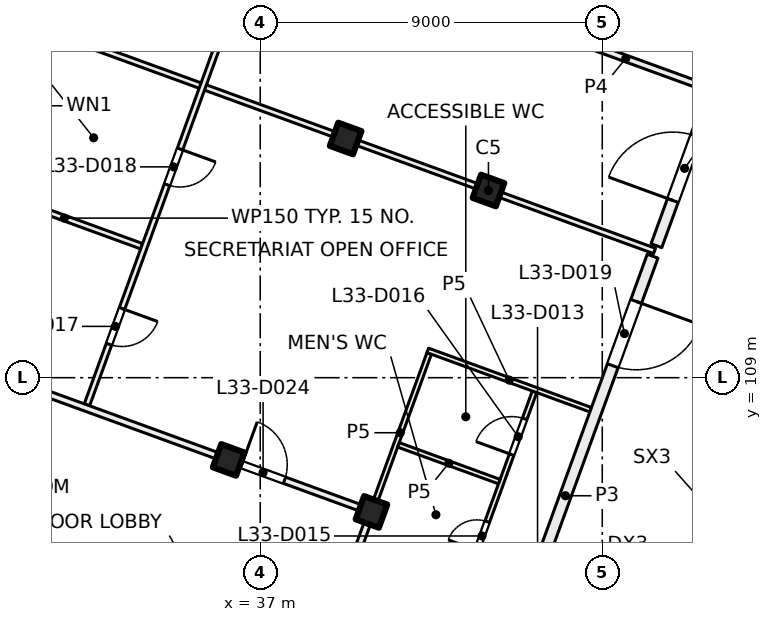
"""IFC4 building model, lengths in metres.
Left out: names, types, materials, properties, quantities, classifications, styles, units other than length and angle.
Written with IfcOpenShell. Run it as: python <this file> out.ifc"""

import sys

from ifc_helpers import new_model, si_unit, direction, frame, frame_2d, origin, origin_2d, place, context, subcontext, project, spatial, rectangle, extrude, element, fill, save


model = new_model("IFC4")
c1 = context("Model", 3, precision=1e-05, world=origin(), true_north=direction((0.0, 1.0)))
c2 = subcontext(c1, "Body", "Model", "MODEL_VIEW")
j1 = project(units=[si_unit("LENGTHUNIT", "METRE"), si_unit("PLANEANGLEUNIT", "RADIAN")], contexts=[c1])
p1 = place(None, origin())
s1 = spatial("IfcSite", under=j1, at=p1, CompositionType="ELEMENT")
p2 = place(p1, origin())
s2 = spatial("IfcBuilding", under=s1, at=p2, CompositionType="ELEMENT")
p3 = place(p2, frame((0.0, 0.0, 142.5)))
s3 = spatial("IfcBuildingStorey", under=s2, at=p3, CompositionType="ELEMENT", Elevation=142.5)
for number, where, z_axis, x_axis in (
    (1, (43.006, 113.925, 0.0), (0.0, 0.0, 1.0), (-0.342, -0.94, 0.0)),
    (2, (39.927, 105.468, 0.0), (0.0, 0.0, 1.0), (-0.342, -0.94, 0.0)),
    (3, (39.247, 115.293, 0.0), (0.0, 0.0, 1.0), (-0.342, -0.94, 0.0)),
    (4, (36.169, 106.836, 0.0), (0.0, 0.0, 1.0), (-0.342, -0.94, 0.0)),
):
    element("IfcColumn", number, at=place(p3, frame(where, z_axis=z_axis, x_axis=x_axis)), inside=s3, PredefinedType="COLUMN", context=c2, shape_type="SweptSolid", body=[
        extrude(rectangle(XDim=0.65, YDim=0.65, at=origin_2d()), origin(), (0.0, 0.0, 1.0), 4.0),
    ])
p4 = place(p3, frame((52.212, 113.783, 0.0), z_axis=(0.0, 0.0, 1.0), x_axis=(-0.34202521188, -0.939690775968, 0.0)))
e5 = element("IfcWall", 5, at=p4, inside=s3, PredefinedType="SOLIDWALL", context=c2, shape_type="SweptSolid", body=[
    extrude(rectangle(XDim=21.745, YDim=0.6, at=frame_2d((10.873, 0.0))), origin(), (0.0, 0.0, 1.0), 3.625),
])
p5 = place(p4, frame((3.765, 0.0, 0.9)))
e6 = element("IfcOpeningElement", 6, at=p5, cuts=e5, PredefinedType="OPENING", context=c2, shape_type="SweptSolid", body=[
    extrude(rectangle(XDim=3.0, YDim=2.4, at=frame_2d((1.5, 1.2))), frame((0.0, 0.31, 0.0), z_axis=(0.0, -1.0, 0.0), x_axis=(1.0, 0.0, 0.0)), (0.0, 0.0, 1.0), 0.62),
])
p6 = place(p4, frame((8.865, 0.0, 0.0)))
e7 = element("IfcOpeningElement", 7, at=p6, cuts=e5, PredefinedType="OPENING", context=c2, shape_type="SweptSolid", body=[
    extrude(rectangle(XDim=1.8, YDim=2.4, at=frame_2d((0.9, 1.2))), frame((0.0, 0.31, 0.0), z_axis=(0.0, -1.0, 0.0), x_axis=(1.0, 0.0, 0.0)), (0.0, 0.0, 1.0), 0.62),
])
p7 = place(p4, frame((12.765, 0.0, 0.9)))
e8 = element("IfcOpeningElement", 8, at=p7, cuts=e5, PredefinedType="OPENING", context=c2, shape_type="SweptSolid", body=[
    extrude(rectangle(XDim=3.0, YDim=2.4, at=frame_2d((1.5, 1.2))), frame((0.0, 0.31, 0.0), z_axis=(0.0, -1.0, 0.0), x_axis=(1.0, 0.0, 0.0)), (0.0, 0.0, 1.0), 0.62),
])
p8 = place(p4, frame((17.265, 0.0, 0.9)))
e9 = element("IfcOpeningElement", 9, at=p8, cuts=e5, PredefinedType="OPENING", context=c2, shape_type="SweptSolid", body=[
    extrude(rectangle(XDim=3.0, YDim=2.4, at=frame_2d((1.5, 1.2))), frame((0.0, 0.31, 0.0), z_axis=(0.0, -1.0, 0.0), x_axis=(1.0, 0.0, 0.0)), (0.0, 0.0, 1.0), 0.62),
])
p9 = place(p3, frame((24.666, 100.669, 0.0), z_axis=(0.0, 0.0, 1.0), x_axis=(0.34201964167, 0.939692803373, 0.0)))
e10 = element("IfcWall", 10, at=p9, inside=s3, PredefinedType="SOLIDWALL", context=c2, shape_type="SweptSolid", body=[
    extrude(rectangle(XDim=32.884, YDim=0.6, at=frame_2d((16.442, 0.0))), origin(), (0.0, 0.0, 1.0), 3.625),
])
p10 = place(p9, frame((1.48, 0.0, 0.9)))
e11 = element("IfcOpeningElement", 11, at=p10, cuts=e10, PredefinedType="OPENING", context=c2, shape_type="SweptSolid", body=[
    extrude(rectangle(XDim=3.0, YDim=2.4, at=frame_2d((1.5, 1.2))), frame((0.0, 0.31, 0.0), z_axis=(0.0, -1.0, 0.0), x_axis=(1.0, 0.0, 0.0)), (0.0, 0.0, 1.0), 0.62),
])
p11 = place(p9, frame((5.98, 0.0, 0.9)))
e12 = element("IfcOpeningElement", 12, at=p11, cuts=e10, PredefinedType="OPENING", context=c2, shape_type="SweptSolid", body=[
    extrude(rectangle(XDim=3.0, YDim=2.4, at=frame_2d((1.5, 1.2))), frame((0.0, 0.31, 0.0), z_axis=(0.0, -1.0, 0.0), x_axis=(1.0, 0.0, 0.0)), (0.0, 0.0, 1.0), 0.62),
])
p12 = place(p9, frame((11.08, 0.0, 0.0)))
e13 = element("IfcOpeningElement", 13, at=p12, cuts=e10, PredefinedType="OPENING", context=c2, shape_type="SweptSolid", body=[
    extrude(rectangle(XDim=1.8, YDim=2.4, at=frame_2d((0.9, 1.2))), frame((0.0, 0.31, 0.0), z_axis=(0.0, -1.0, 0.0), x_axis=(1.0, 0.0, 0.0)), (0.0, 0.0, 1.0), 0.62),
])
p13 = place(p9, frame((14.98, 0.0, 0.9)))
e14 = element("IfcOpeningElement", 14, at=p13, cuts=e10, PredefinedType="OPENING", context=c2, shape_type="SweptSolid", body=[
    extrude(rectangle(XDim=3.0, YDim=2.4, at=frame_2d((1.5, 1.2))), frame((0.0, 0.31, 0.0), z_axis=(0.0, -1.0, 0.0), x_axis=(1.0, 0.0, 0.0)), (0.0, 0.0, 1.0), 0.62),
])
p14 = place(p9, frame((19.48, 0.0, 0.9)))
e15 = element("IfcOpeningElement", 15, at=p14, cuts=e10, PredefinedType="OPENING", context=c2, shape_type="SweptSolid", body=[
    extrude(rectangle(XDim=3.0, YDim=2.4, at=frame_2d((1.5, 1.2))), frame((0.0, 0.31, 0.0), z_axis=(0.0, -1.0, 0.0), x_axis=(1.0, 0.0, 0.0)), (0.0, 0.0, 1.0), 0.62),
])
p15 = place(p9, frame((24.58, 0.0, 0.0)))
e16 = element("IfcOpeningElement", 16, at=p15, cuts=e10, PredefinedType="OPENING", context=c2, shape_type="SweptSolid", body=[
    extrude(rectangle(XDim=1.8, YDim=2.4, at=frame_2d((0.9, 1.2))), frame((0.0, 0.31, 0.0), z_axis=(0.0, -1.0, 0.0), x_axis=(1.0, 0.0, 0.0)), (0.0, 0.0, 1.0), 0.62),
])
p16 = place(p9, frame((28.48, 0.0, 0.9)))
e17 = element("IfcOpeningElement", 17, at=p16, cuts=e10, PredefinedType="OPENING", context=c2, shape_type="SweptSolid", body=[
    extrude(rectangle(XDim=3.0, YDim=2.4, at=frame_2d((1.5, 1.2))), frame((0.0, 0.31, 0.0), z_axis=(0.0, -1.0, 0.0), x_axis=(1.0, 0.0, 0.0)), (0.0, 0.0, 1.0), 0.62),
])
p17 = place(p3, frame((26.736, 105.48, 0.0), z_axis=(0.0, 0.0, 1.0), x_axis=(0.939721611154, -0.341940482438, 0.0)))
e18 = element("IfcWall", 18, at=p17, inside=s3, PredefinedType="PARTITIONING", context=c2, shape_type="SweptSolid", body=[
    extrude(rectangle(XDim=12.312, YDim=0.175, at=frame_2d((6.156, 0.0))), origin(), (0.0, 0.0, 1.0), 3.625),
])
p18 = place(p3, frame((29.814, 113.938, 0.0), z_axis=(0.0, 0.0, 1.0), x_axis=(0.93973078783, -0.341915262023, 0.0)))
e19 = element("IfcWall", 19, at=p18, inside=s3, PredefinedType="PARTITIONING", context=c2, shape_type="SweptSolid", body=[
    extrude(rectangle(XDim=4.326, YDim=0.15, at=frame_2d((2.163, 0.0))), origin(), (0.0, 0.0, 1.0), 3.625),
])
p19 = place(p3, frame((31.353, 118.166, 0.0), z_axis=(0.0, 0.0, 1.0), x_axis=(0.939701413127, -0.341995985602, 0.0)))
e20 = element("IfcWall", 20, at=p19, inside=s3, PredefinedType="PARTITIONING", context=c2, shape_type="SweptSolid", body=[
    extrude(rectangle(XDim=17.05, YDim=0.15, at=frame_2d((8.525, 0.0))), origin(), (0.0, 0.0, 1.0), 3.625),
])
p20 = place(p3, frame((37.053, 120.96, 0.0), z_axis=(0.0, 0.0, 1.0), x_axis=(-0.342023551531, -0.939691380293, 0.0)))
e21 = element("IfcWall", 21, at=p20, inside=s3, PredefinedType="PARTITIONING", context=c2, shape_type="SweptSolid", body=[
    extrude(rectangle(XDim=13.488, YDim=0.15, at=frame_2d((6.744, 0.0))), origin(), (0.0, 0.0, 1.0), 3.625),
])
p21 = place(p20, frame((10.791, 0.0, 0.0)))
e22 = element("IfcOpeningElement", 22, at=p21, cuts=e21, PredefinedType="OPENING", context=c2, shape_type="SweptSolid", body=[
    extrude(rectangle(XDim=1.0, YDim=2.1, at=frame_2d((0.5, 1.05))), frame((0.0, 0.085, 0.0), z_axis=(0.0, -1.0, 0.0), x_axis=(1.0, 0.0, 0.0)), (0.0, 0.0, 1.0), 0.17),
])
p22 = place(p20, frame((6.324, 0.0, 0.0)))
e23 = element("IfcOpeningElement", 23, at=p22, cuts=e21, PredefinedType="OPENING", context=c2, shape_type="SweptSolid", body=[
    extrude(rectangle(XDim=1.0, YDim=2.1, at=frame_2d((0.5, 1.05))), frame((0.0, 0.085, 0.0), z_axis=(0.0, -1.0, 0.0), x_axis=(1.0, 0.0, 0.0)), (0.0, 0.0, 1.0), 0.17),
])
p23 = place(p20, frame((1.824, 0.0, 0.0)))
e24 = element("IfcOpeningElement", 24, at=p23, cuts=e21, PredefinedType="OPENING", context=c2, shape_type="SweptSolid", body=[
    extrude(rectangle(XDim=1.0, YDim=2.1, at=frame_2d((0.5, 1.05))), frame((0.0, 0.085, 0.0), z_axis=(0.0, -1.0, 0.0), x_axis=(1.0, 0.0, 0.0)), (0.0, 0.0, 1.0), 0.17),
])
p24 = place(p3, frame((38.418, 101.322, 0.0), z_axis=(0.0, 0.0, 1.0), x_axis=(0.341987815327, 0.939704386585, 0.0)))
e25 = element("IfcWall", 25, at=p24, inside=s3, PredefinedType="PARTITIONING", context=c2, shape_type="SweptSolid", body=[
    extrude(rectangle(XDim=4.325, YDim=0.175, at=frame_2d((2.162, 0.0))), origin(), (0.0, 0.0, 1.0), 3.625),
])
p25 = place(p3, frame((39.926, 105.465, 0.0), z_axis=(0.0, 0.0, 1.0), x_axis=(0.342263852659, 0.93960388205, 0.0)))
e26 = element("IfcWall", 26, at=p25, inside=s3, PredefinedType="PARTITIONING", context=c2, shape_type="SweptSolid", body=[
    extrude(rectangle(XDim=4.441, YDim=0.125, at=frame_2d((2.221, 0.0))), origin(), (0.0, 0.0, 1.0), 3.625),
])
p26 = place(p3, frame((28.275, 109.709, 0.0), z_axis=(0.0, 0.0, 1.0), x_axis=(0.939698441386, -0.342004150936, 0.0)))
e27 = element("IfcWall", 27, at=p26, inside=s3, PredefinedType="PARTITIONING", context=c2, shape_type="SweptSolid", body=[
    extrude(rectangle(XDim=12.312, YDim=0.175, at=frame_2d((6.156, 0.0))), origin(), (0.0, 0.0, 1.0), 3.625),
])
p27 = place(p26, frame((8.765, 0.0, 0.0)))
e28 = element("IfcOpeningElement", 28, at=p27, cuts=e27, PredefinedType="OPENING", context=c2, shape_type="SweptSolid", body=[
    extrude(rectangle(XDim=1.2, YDim=2.1, at=frame_2d((0.6, 1.05))), frame((0.0, 0.097, 0.0), z_axis=(0.0, -1.0, 0.0), x_axis=(1.0, 0.0, 0.0)), (0.0, 0.0, 1.0), 0.195),
])
p28 = place(p3, frame((41.181, 100.29, 0.0), z_axis=(0.0, 0.0, 1.0), x_axis=(0.34222012082, 0.939619810831, 0.0)))
e29 = element("IfcWall", 29, at=p28, inside=s3, PredefinedType="PARTITIONING", context=c2, shape_type="SweptSolid", body=[
    extrude(rectangle(XDim=8.875, YDim=0.125, at=frame_2d((4.438, 0.0))), origin(), (0.0, 0.0, 1.0), 3.625),
])
p29 = place(p28, frame((1.258, 0.0, 0.0)))
e30 = element("IfcOpeningElement", 30, at=p29, cuts=e29, PredefinedType="OPENING", context=c2, shape_type="SweptSolid", body=[
    extrude(rectangle(XDim=0.8, YDim=2.1, at=frame_2d((0.4, 1.05))), frame((0.0, 0.073, 0.0), z_axis=(0.0, -1.0, 0.0), x_axis=(1.0, 0.0, 0.0)), (0.0, 0.0, 1.0), 0.145),
])
p30 = place(p28, frame((4.437, 0.0, 0.0)))
e31 = element("IfcOpeningElement", 31, at=p30, cuts=e29, PredefinedType="OPENING", context=c2, shape_type="SweptSolid", body=[
    extrude(rectangle(XDim=0.8, YDim=2.1, at=frame_2d((0.4, 1.05))), frame((0.0, 0.073, 0.0), z_axis=(0.0, -1.0, 0.0), x_axis=(1.0, 0.0, 0.0)), (0.0, 0.0, 1.0), 0.145),
])
p31 = place(p28, frame((7.116, 0.0, 0.0)))
e32 = element("IfcOpeningElement", 32, at=p31, cuts=e29, PredefinedType="OPENING", context=c2, shape_type="SweptSolid", body=[
    extrude(rectangle(XDim=1.0, YDim=2.1, at=frame_2d((0.5, 1.05))), frame((0.0, 0.073, 0.0), z_axis=(0.0, -1.0, 0.0), x_axis=(1.0, 0.0, 0.0)), (0.0, 0.0, 1.0), 0.145),
])
p32 = place(p3, frame((41.408, 109.718, 0.0), z_axis=(0.0, 0.0, 1.0), x_axis=(0.939646475447, -0.3421469, 0.0)))
e33 = element("IfcWall", 33, at=p32, inside=s3, PredefinedType="PARTITIONING", context=c2, shape_type="SweptSolid", body=[
    extrude(rectangle(XDim=4.562, YDim=0.125, at=frame_2d((2.281, 0.0))), origin(), (0.0, 0.0, 1.0), 3.625),
])
p33 = place(p3, frame((47.325, 112.197, 0.0), z_axis=(0.0, 0.0, 1.0), x_axis=(-0.341976837053, -0.93970838185, 0.0)))
e34 = element("IfcWall", 34, at=p33, inside=s3, PredefinedType="PARTITIONING", context=c2, shape_type="SweptSolid", body=[
    extrude(rectangle(XDim=13.416, YDim=0.3, at=frame_2d((6.708, 0.0))), origin(), (0.0, 0.0, 1.0), 3.625),
])
p34 = place(p33, frame((8.354, 0.0, 0.0)))
e35 = element("IfcOpeningElement", 35, at=p34, cuts=e34, PredefinedType="OPENING", context=c2, shape_type="SweptSolid", body=[
    extrude(rectangle(XDim=1.0, YDim=2.1, at=frame_2d((0.5, 1.05))), frame((0.0, 0.16, 0.0), z_axis=(0.0, -1.0, 0.0), x_axis=(1.0, 0.0, 0.0)), (0.0, 0.0, 1.0), 0.32),
])
p35 = place(p33, frame((1.267, 0.0, 0.0)))
e36 = element("IfcOpeningElement", 36, at=p35, cuts=e34, PredefinedType="OPENING", context=c2, shape_type="SweptSolid", body=[
    extrude(rectangle(XDim=1.8, YDim=2.1, at=frame_2d((0.9, 1.05))), frame((0.0, 0.16, 0.0), z_axis=(0.0, -1.0, 0.0), x_axis=(1.0, 0.0, 0.0)), (0.0, 0.0, 1.0), 0.32),
])
p36 = place(p3, frame((43.29, 106.266, 0.0), z_axis=(0.0, 0.0, 1.0), x_axis=(-0.939601484935, 0.342270433294, 0.0)))
e37 = element("IfcWall", 37, at=p36, inside=s3, PredefinedType="PARTITIONING", context=c2, shape_type="SweptSolid", body=[
    extrude(rectangle(XDim=2.825, YDim=0.125, at=frame_2d((1.412, 0.0))), origin(), (0.0, 0.0, 1.0), 3.625),
])
p37 = place(p3, frame((44.463, 118.184, 0.0), z_axis=(0.0, 0.0, 1.0), x_axis=(0.939667480086, -0.342089208934, 0.0)))
e38 = element("IfcWall", 38, at=p37, inside=s3, PredefinedType="PARTITIONING", context=c2, shape_type="SweptSolid", body=[
    extrude(rectangle(XDim=4.587, YDim=0.175, at=frame_2d((2.293, 0.0))), origin(), (0.0, 0.0, 1.0), 3.625),
])
p38 = place(p3, frame((47.425, 112.473, 0.0), z_axis=(0.0, 0.0, 1.0), x_axis=(0.34204602842, 0.939683198978, 0.0)))
e39 = element("IfcWall", 39, at=p38, inside=s3, PredefinedType="PARTITIONING", context=c2, shape_type="SweptSolid", body=[
    extrude(rectangle(XDim=9.446, YDim=0.3, at=frame_2d((4.723, 0.0))), origin(), (0.0, 0.0, 1.0), 3.625),
])
p39 = place(p38, frame((6.003, 0.0, 0.0)))
e40 = element("IfcOpeningElement", 40, at=p39, cuts=e39, PredefinedType="OPENING", context=c2, shape_type="SweptSolid", body=[
    extrude(rectangle(XDim=1.2, YDim=2.1, at=frame_2d((0.6, 1.05))), frame((0.0, 0.16, 0.0), z_axis=(0.0, -1.0, 0.0), x_axis=(1.0, 0.0, 0.0)), (0.0, 0.0, 1.0), 0.32),
])
p40 = place(p38, frame((1.267, 0.0, 0.0)))
e41 = element("IfcOpeningElement", 41, at=p40, cuts=e39, PredefinedType="OPENING", context=c2, shape_type="SweptSolid", body=[
    extrude(rectangle(XDim=1.8, YDim=2.1, at=frame_2d((0.9, 1.05))), frame((0.0, 0.16, 0.0), z_axis=(0.0, -1.0, 0.0), x_axis=(1.0, 0.0, 0.0)), (0.0, 0.0, 1.0), 0.32),
])
p41 = place(p30, origin())
e42 = element("IfcDoor", 42, at=p41, inside=s3, OperationType="SINGLE_SWING_LEFT", PredefinedType="DOOR", context=c2, shape_type="SweptSolid", body=[
    extrude(rectangle(XDim=0.8, YDim=2.1, at=frame_2d((0.4, 1.05))), frame((0.0, 0.025, 0.0), z_axis=(0.0, -1.0, 0.0), x_axis=(1.0, 0.0, 0.0)), (0.0, 0.0, 1.0), 0.05),
])
fill(e31, e42)
p42 = place(p31, origin())
e43 = element("IfcDoor", 43, at=p42, inside=s3, OperationType="SINGLE_SWING_LEFT", PredefinedType="DOOR", context=c2, shape_type="SweptSolid", body=[
    extrude(rectangle(XDim=1.0, YDim=2.1, at=frame_2d((0.5, 1.05))), frame((0.0, 0.025, 0.0), z_axis=(0.0, -1.0, 0.0), x_axis=(1.0, 0.0, 0.0)), (0.0, 0.0, 1.0), 0.05),
])
fill(e32, e43)
p43 = place(p21, origin())
e44 = element("IfcDoor", 44, at=p43, inside=s3, OperationType="SINGLE_SWING_LEFT", PredefinedType="DOOR", context=c2, shape_type="SweptSolid", body=[
    extrude(rectangle(XDim=1.0, YDim=2.1, at=frame_2d((0.5, 1.05))), frame((0.0, 0.025, 0.0), z_axis=(0.0, -1.0, 0.0), x_axis=(1.0, 0.0, 0.0)), (0.0, 0.0, 1.0), 0.05),
])
fill(e22, e44)
p44 = place(p22, origin())
e45 = element("IfcDoor", 45, at=p44, inside=s3, OperationType="SINGLE_SWING_RIGHT", PredefinedType="DOOR", context=c2, shape_type="SweptSolid", body=[
    extrude(rectangle(XDim=1.0, YDim=2.1, at=frame_2d((0.5, 1.05))), frame((0.0, 0.025, 0.0), z_axis=(0.0, -1.0, 0.0), x_axis=(1.0, 0.0, 0.0)), (0.0, 0.0, 1.0), 0.05),
])
fill(e23, e45)
p45 = place(p35, origin())
e46 = element("IfcDoor", 46, at=p45, inside=s3, OperationType="DOUBLE_DOOR_SINGLE_SWING", PredefinedType="DOOR", context=c2, shape_type="SweptSolid", body=[
    extrude(rectangle(XDim=1.8, YDim=2.1, at=frame_2d((0.9, 1.05))), frame((0.0, 0.025, 0.0), z_axis=(0.0, -1.0, 0.0), x_axis=(1.0, 0.0, 0.0)), (0.0, 0.0, 1.0), 0.05),
])
fill(e36, e46)
p46 = place(p40, origin())
e47 = element("IfcDoor", 47, at=p46, inside=s3, OperationType="DOUBLE_DOOR_SINGLE_SWING", PredefinedType="DOOR", context=c2, shape_type="SweptSolid", body=[
    extrude(rectangle(XDim=1.8, YDim=2.1, at=frame_2d((0.9, 1.05))), frame((0.0, 0.025, 0.0), z_axis=(0.0, -1.0, 0.0), x_axis=(1.0, 0.0, 0.0)), (0.0, 0.0, 1.0), 0.05),
])
fill(e41, e47)
p47 = place(p27, origin())
e48 = element("IfcDoor", 48, at=p47, inside=s3, OperationType="DOUBLE_DOOR_SINGLE_SWING", PredefinedType="DOOR", context=c2, shape_type="SweptSolid", body=[
    extrude(rectangle(XDim=1.2, YDim=2.1, at=frame_2d((0.6, 1.05))), frame((0.0, 0.025, 0.0), z_axis=(0.0, -1.0, 0.0), x_axis=(1.0, 0.0, 0.0)), (0.0, 0.0, 1.0), 0.05),
])
fill(e28, e48)
save(model, sys.argv[1])
